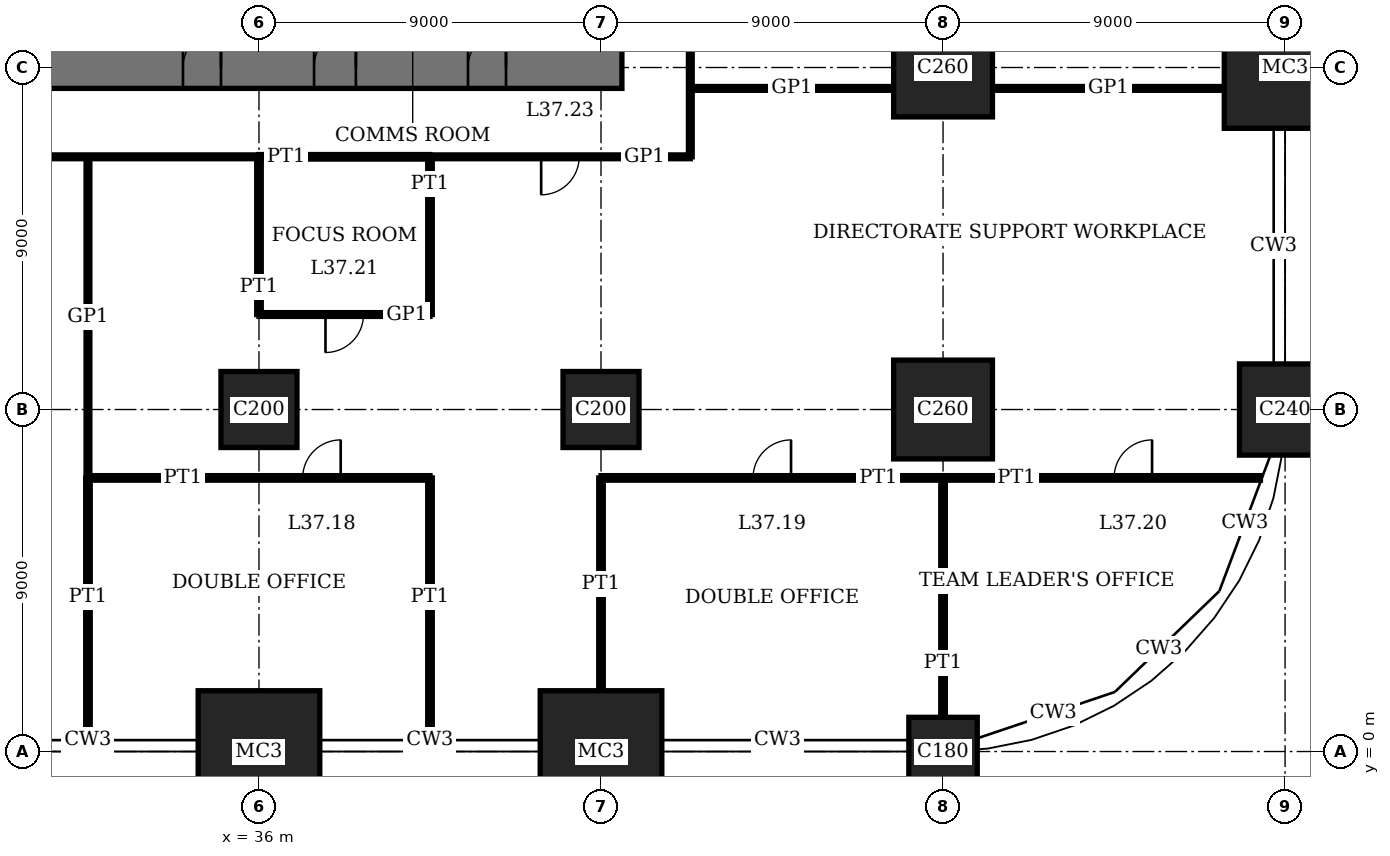
"""IFC4 building model, lengths in metres.
Left out: names, types, materials, properties, quantities, classifications, styles, units other than length and angle.
Written with IfcOpenShell. Run it as: python <this file> out.ifc"""

import sys

from ifc_helpers import new_model, si_unit, direction, frame, frame_2d, origin, origin_2d, place, context, subcontext, project, spatial, rectangle, extrude, element, fill, save


model = new_model("IFC4")
c1 = context("Model", 3, precision=1e-05, world=origin(), true_north=direction((0.0, 1.0)))
c2 = subcontext(c1, "Body", "Model", "MODEL_VIEW")
j1 = project(units=[si_unit("LENGTHUNIT", "METRE"), si_unit("PLANEANGLEUNIT", "RADIAN")], contexts=[c1])
p1 = place(None, origin())
s1 = spatial("IfcSite", under=j1, at=p1, CompositionType="ELEMENT")
p2 = place(p1, origin())
s2 = spatial("IfcBuilding", under=s1, at=p2, CompositionType="ELEMENT")
p3 = place(p2, frame((0.0, 0.0, 153.0)))
s3 = spatial("IfcBuildingStorey", under=s2, at=p3, CompositionType="ELEMENT", Elevation=153.0)
p4 = place(p3, frame((36.0, 0.0, 0.0), z_axis=(0.0, 0.0, 1.0), x_axis=(1.0, 0.0, 0.0)))
e1 = element("IfcColumn", 1, at=p4, inside=s3, PredefinedType="COLUMN", context=c2, shape_type="SweptSolid", body=[
    extrude(rectangle(XDim=3.2, YDim=3.2, at=origin_2d()), origin(), (0.0, 0.0, 1.0), 4.2),
])
p5 = place(p3, frame((36.0, 9.0, 0.0), z_axis=(0.0, 0.0, 1.0), x_axis=(1.0, 0.0, 0.0)))
e2 = element("IfcColumn", 2, at=p5, inside=s3, PredefinedType="COLUMN", context=c2, shape_type="SweptSolid", body=[
    extrude(rectangle(XDim=2.0, YDim=2.0, at=origin_2d()), origin(), (0.0, 0.0, 1.0), 4.2),
])
p6 = place(p3, frame((45.0, 0.0, 0.0), z_axis=(0.0, 0.0, 1.0), x_axis=(1.0, 0.0, 0.0)))
e3 = element("IfcColumn", 3, at=p6, inside=s3, PredefinedType="COLUMN", context=c2, shape_type="SweptSolid", body=[
    extrude(rectangle(XDim=3.2, YDim=3.2, at=origin_2d()), origin(), (0.0, 0.0, 1.0), 4.2),
])
p7 = place(p3, frame((45.0, 9.0, 0.0), z_axis=(0.0, 0.0, 1.0), x_axis=(1.0, 0.0, 0.0)))
e4 = element("IfcColumn", 4, at=p7, inside=s3, PredefinedType="COLUMN", context=c2, shape_type="SweptSolid", body=[
    extrude(rectangle(XDim=2.0, YDim=2.0, at=origin_2d()), origin(), (0.0, 0.0, 1.0), 4.2),
])
p8 = place(p3, frame((54.0, 0.0, 0.0), z_axis=(0.0, 0.0, 1.0), x_axis=(1.0, 0.0, 0.0)))
e5 = element("IfcColumn", 5, at=p8, inside=s3, PredefinedType="COLUMN", context=c2, shape_type="SweptSolid", body=[
    extrude(rectangle(XDim=1.8, YDim=1.8, at=origin_2d()), origin(), (0.0, 0.0, 1.0), 4.2),
])
for number, where, z_axis, x_axis in (
    (6, (54.0, 9.0, 0.0), (0.0, 0.0, 1.0), (1.0, 0.0, 0.0)),
    (7, (54.0, 18.0, 0.0), (0.0, 0.0, 1.0), (1.0, 0.0, 0.0)),
):
    element("IfcColumn", number, at=place(p3, frame(where, z_axis=z_axis, x_axis=x_axis)), inside=s3, PredefinedType="COLUMN", context=c2, shape_type="SweptSolid", body=[
        extrude(rectangle(XDim=2.6, YDim=2.6, at=origin_2d()), origin(), (0.0, 0.0, 1.0), 4.2),
    ])
p9 = place(p3, frame((63.0, 9.0, 0.0), z_axis=(0.0, 0.0, 1.0), x_axis=(1.0, 0.0, 0.0)))
e8 = element("IfcColumn", 8, at=p9, inside=s3, PredefinedType="COLUMN", context=c2, shape_type="SweptSolid", body=[
    extrude(rectangle(XDim=2.4, YDim=2.4, at=origin_2d()), origin(), (0.0, 0.0, 1.0), 4.2),
])
p10 = place(p3, frame((63.0, 18.0, 0.0), z_axis=(0.0, 0.0, 1.0), x_axis=(1.0, 0.0, 0.0)))
e9 = element("IfcColumn", 9, at=p10, inside=s3, PredefinedType="COLUMN", context=c2, shape_type="SweptSolid", body=[
    extrude(rectangle(XDim=3.2, YDim=3.2, at=origin_2d()), origin(), (0.0, 0.0, 1.0), 4.2),
])
p11 = place(p3, frame((17.45, 18.0, 0.0), z_axis=(0.0, 0.0, 1.0), x_axis=(1.0, 0.0, 0.0)))
e10 = element("IfcWall", 10, at=p11, inside=s3, PredefinedType="SHEAR", context=c2, shape_type="SweptSolid", body=[
    extrude(rectangle(XDim=28.1, YDim=1.1, at=frame_2d((14.05, 0.0))), origin(), (0.0, 0.0, 1.0), 4.2),
])
p12 = place(p11, frame((11.55, 0.0, 0.0)))
e11 = element("IfcOpeningElement", 11, at=p12, cuts=e10, PredefinedType="OPENING", context=c2, shape_type="SweptSolid", body=[
    extrude(rectangle(XDim=1.0, YDim=2.4, at=frame_2d((0.5, 1.2))), frame((0.0, 0.56, 0.0), z_axis=(0.0, -1.0, 0.0), x_axis=(1.0, 0.0, 0.0)), (0.0, 0.0, 1.0), 1.12),
])
p13 = place(p11, frame((16.55, 0.0, 0.0)))
e12 = element("IfcOpeningElement", 12, at=p13, cuts=e10, PredefinedType="OPENING", context=c2, shape_type="SweptSolid", body=[
    extrude(rectangle(XDim=1.0, YDim=2.4, at=frame_2d((0.5, 1.2))), frame((0.0, 0.56, 0.0), z_axis=(0.0, -1.0, 0.0), x_axis=(1.0, 0.0, 0.0)), (0.0, 0.0, 1.0), 1.12),
])
p14 = place(p11, frame((20.0, 0.0, 0.0)))
e13 = element("IfcOpeningElement", 13, at=p14, cuts=e10, PredefinedType="OPENING", context=c2, shape_type="SweptSolid", body=[
    extrude(rectangle(XDim=1.1, YDim=2.4, at=frame_2d((0.55, 1.2))), frame((0.0, 0.56, 0.0), z_axis=(0.0, -1.0, 0.0), x_axis=(1.0, 0.0, 0.0)), (0.0, 0.0, 1.0), 1.12),
])
p15 = place(p11, frame((24.05, 0.0, 0.0)))
e14 = element("IfcOpeningElement", 14, at=p15, cuts=e10, PredefinedType="OPENING", context=c2, shape_type="SweptSolid", body=[
    extrude(rectangle(XDim=1.0, YDim=2.4, at=frame_2d((0.5, 1.2))), frame((0.0, 0.56, 0.0), z_axis=(0.0, -1.0, 0.0), x_axis=(1.0, 0.0, 0.0)), (0.0, 0.0, 1.0), 1.12),
])
p16 = place(p3, frame((31.5, 7.2, 0.0), z_axis=(0.0, 0.0, 1.0), x_axis=(1.0, 0.0, 0.0)))
e15 = element("IfcWall", 15, at=p16, inside=s3, PredefinedType="PARTITIONING", context=c2, shape_type="SweptSolid", body=[
    extrude(rectangle(XDim=9.0, YDim=0.12, at=frame_2d((4.5, 0.0))), origin(), (0.0, 0.0, 1.0), 3.85),
])
p17 = place(p16, frame((5.65, 0.0, 0.0)))
e16 = element("IfcOpeningElement", 16, at=p17, cuts=e15, PredefinedType="OPENING", context=c2, shape_type="SweptSolid", body=[
    extrude(rectangle(XDim=1.0, YDim=2.4, at=frame_2d((0.5, 1.2))), frame((0.0, 0.07, 0.0), z_axis=(0.0, -1.0, 0.0), x_axis=(1.0, 0.0, 0.0)), (0.0, 0.0, 1.0), 0.14),
])
p18 = place(p3, frame((45.0, 7.2, 0.0), z_axis=(0.0, 0.0, 1.0), x_axis=(1.0, 0.0, 0.0)))
e17 = element("IfcWall", 17, at=p18, inside=s3, PredefinedType="PARTITIONING", context=c2, shape_type="SweptSolid", body=[
    extrude(rectangle(XDim=9.0, YDim=0.12, at=frame_2d((4.5, 0.0))), origin(), (0.0, 0.0, 1.0), 3.85),
])
p19 = place(p18, frame((4.0, 0.0, 0.0)))
e18 = element("IfcOpeningElement", 18, at=p19, cuts=e17, PredefinedType="OPENING", context=c2, shape_type="SweptSolid", body=[
    extrude(rectangle(XDim=1.0, YDim=2.4, at=frame_2d((0.5, 1.2))), frame((0.0, 0.07, 0.0), z_axis=(0.0, -1.0, 0.0), x_axis=(1.0, 0.0, 0.0)), (0.0, 0.0, 1.0), 0.14),
])
p20 = place(p3, frame((54.0, 7.2, 0.0), z_axis=(0.0, 0.0, 1.0), x_axis=(1.0, 0.0, 0.0)))
e19 = element("IfcWall", 19, at=p20, inside=s3, PredefinedType="PARTITIONING", context=c2, shape_type="SweptSolid", body=[
    extrude(rectangle(XDim=8.351, YDim=0.12, at=frame_2d((4.176, 0.0))), origin(), (0.0, 0.0, 1.0), 3.85),
])
p21 = place(p20, frame((4.5, 0.0, 0.0)))
e20 = element("IfcOpeningElement", 20, at=p21, cuts=e19, PredefinedType="OPENING", context=c2, shape_type="SweptSolid", body=[
    extrude(rectangle(XDim=1.0, YDim=2.4, at=frame_2d((0.5, 1.2))), frame((0.0, 0.07, 0.0), z_axis=(0.0, -1.0, 0.0), x_axis=(1.0, 0.0, 0.0)), (0.0, 0.0, 1.0), 0.14),
])
p22 = place(p3, frame((36.0, 11.5, 0.0), z_axis=(0.0, 0.0, 1.0), x_axis=(1.0, 0.0, 0.0)))
e21 = element("IfcWall", 21, at=p22, inside=s3, PredefinedType="PARTITIONING", context=c2, shape_type="SweptSolid", body=[
    extrude(rectangle(XDim=4.5, YDim=0.1, at=frame_2d((2.25, 0.0))), origin(), (0.0, 0.0, 1.0), 3.85),
])
p23 = place(p22, frame((1.75, 0.0, 0.0)))
e22 = element("IfcOpeningElement", 22, at=p23, cuts=e21, PredefinedType="OPENING", context=c2, shape_type="SweptSolid", body=[
    extrude(rectangle(XDim=1.0, YDim=2.4, at=frame_2d((0.5, 1.2))), frame((0.0, 0.06, 0.0), z_axis=(0.0, -1.0, 0.0), x_axis=(1.0, 0.0, 0.0)), (0.0, 0.0, 1.0), 0.12),
])
p24 = place(p3, frame((36.0, 15.65, 0.0), z_axis=(0.0, 0.0, 1.0), x_axis=(1.0, 0.0, 0.0)))
e23 = element("IfcWall", 23, at=p24, inside=s3, PredefinedType="PARTITIONING", context=c2, shape_type="SweptSolid", body=[
    extrude(rectangle(XDim=4.5, YDim=0.12, at=frame_2d((2.25, 0.0))), origin(), (0.0, 0.0, 1.0), 3.85),
])
p25 = place(p3, frame((15.65, 15.65, 0.0), z_axis=(0.0, 0.0, 1.0), x_axis=(1.0, 0.0, 0.0)))
e24 = element("IfcWall", 24, at=p25, inside=s3, PredefinedType="PARTITIONING", context=c2, shape_type="SweptSolid", body=[
    extrude(rectangle(XDim=20.35, YDim=0.1, at=frame_2d((10.175, 0.0))), origin(), (0.0, 0.0, 1.0), 3.85),
])
p26 = place(p25, frame((9.675, 0.0, 0.0)))
e25 = element("IfcOpeningElement", 25, at=p26, cuts=e24, PredefinedType="OPENING", context=c2, shape_type="SweptSolid", body=[
    extrude(rectangle(XDim=1.0, YDim=2.4, at=frame_2d((0.5, 1.2))), frame((0.0, 0.06, 0.0), z_axis=(0.0, -1.0, 0.0), x_axis=(1.0, 0.0, 0.0)), (0.0, 0.0, 1.0), 0.12),
])
p27 = place(p3, frame((40.5, 15.65, 0.0), z_axis=(0.0, 0.0, 1.0), x_axis=(1.0, 0.0, 0.0)))
e26 = element("IfcWall", 26, at=p27, inside=s3, PredefinedType="PARTITIONING", context=c2, shape_type="SweptSolid", body=[
    extrude(rectangle(XDim=6.85, YDim=0.1, at=frame_2d((3.425, 0.0))), origin(), (0.0, 0.0, 1.0), 3.85),
])
p28 = place(p27, frame((2.925, 0.0, 0.0)))
e27 = element("IfcOpeningElement", 27, at=p28, cuts=e26, PredefinedType="OPENING", context=c2, shape_type="SweptSolid", body=[
    extrude(rectangle(XDim=1.0, YDim=2.4, at=frame_2d((0.5, 1.2))), frame((0.0, 0.06, 0.0), z_axis=(0.0, -1.0, 0.0), x_axis=(1.0, 0.0, 0.0)), (0.0, 0.0, 1.0), 0.12),
])
p29 = place(p3, frame((47.35, 17.45, 0.0), z_axis=(0.0, 0.0, 1.0), x_axis=(1.0, 0.0, 0.0)))
e28 = element("IfcWall", 28, at=p29, inside=s3, PredefinedType="PARTITIONING", context=c2, shape_type="SweptSolid", body=[
    extrude(rectangle(XDim=5.35, YDim=0.1, at=frame_2d((2.675, 0.0))), origin(), (0.0, 0.0, 1.0), 3.85),
])
p30 = place(p3, frame((55.3, 17.45, 0.0), z_axis=(0.0, 0.0, 1.0), x_axis=(1.0, 0.0, 0.0)))
e29 = element("IfcWall", 29, at=p30, inside=s3, PredefinedType="PARTITIONING", context=c2, shape_type="SweptSolid", body=[
    extrude(rectangle(XDim=6.1, YDim=0.1, at=frame_2d((3.05, 0.0))), origin(), (0.0, 0.0, 1.0), 3.85),
])
p31 = place(p3, frame((31.5, 0.31, 0.0), z_axis=(0.0, 0.0, 1.0), x_axis=(0.0, 1.0, 0.0)))
e30 = element("IfcWall", 30, at=p31, inside=s3, PredefinedType="PARTITIONING", context=c2, shape_type="SweptSolid", body=[
    extrude(rectangle(XDim=6.89, YDim=0.12, at=frame_2d((3.445, 0.0))), origin(), (0.0, 0.0, 1.0), 3.85),
])
p32 = place(p3, frame((31.5, 7.2, 0.0), z_axis=(0.0, 0.0, 1.0), x_axis=(0.0, 1.0, 0.0)))
e31 = element("IfcWall", 31, at=p32, inside=s3, PredefinedType="PARTITIONING", context=c2, shape_type="SweptSolid", body=[
    extrude(rectangle(XDim=8.45, YDim=0.1, at=frame_2d((4.225, 0.0))), origin(), (0.0, 0.0, 1.0), 3.85),
])
p33 = place(p3, frame((36.0, 11.5, 0.0), z_axis=(0.0, 0.0, 1.0), x_axis=(0.0, 1.0, 0.0)))
e32 = element("IfcWall", 32, at=p33, inside=s3, PredefinedType="PARTITIONING", context=c2, shape_type="SweptSolid", body=[
    extrude(rectangle(XDim=4.15, YDim=0.12, at=frame_2d((2.075, 0.0))), origin(), (0.0, 0.0, 1.0), 3.25),
])
p34 = place(p3, frame((40.5, 0.31, 0.0), z_axis=(0.0, 0.0, 1.0), x_axis=(0.0, 1.0, 0.0)))
e33 = element("IfcWall", 33, at=p34, inside=s3, PredefinedType="PARTITIONING", context=c2, shape_type="SweptSolid", body=[
    extrude(rectangle(XDim=6.89, YDim=0.12, at=frame_2d((3.445, 0.0))), origin(), (0.0, 0.0, 1.0), 3.85),
])
p35 = place(p3, frame((40.5, 11.5, 0.0), z_axis=(0.0, 0.0, 1.0), x_axis=(0.0, 1.0, 0.0)))
e34 = element("IfcWall", 34, at=p35, inside=s3, PredefinedType="PARTITIONING", context=c2, shape_type="SweptSolid", body=[
    extrude(rectangle(XDim=4.15, YDim=0.12, at=frame_2d((2.075, 0.0))), origin(), (0.0, 0.0, 1.0), 3.85),
])
p36 = place(p3, frame((45.0, 1.6, 0.0), z_axis=(0.0, 0.0, 1.0), x_axis=(0.0, 1.0, 0.0)))
e35 = element("IfcWall", 35, at=p36, inside=s3, PredefinedType="PARTITIONING", context=c2, shape_type="SweptSolid", body=[
    extrude(rectangle(XDim=5.6, YDim=0.12, at=frame_2d((2.8, 0.0))), origin(), (0.0, 0.0, 1.0), 3.25),
])
p37 = place(p3, frame((47.35, 15.65, 0.0), z_axis=(0.0, 0.0, 1.0), x_axis=(0.0, 1.0, 0.0)))
e36 = element("IfcWall", 36, at=p37, inside=s3, PredefinedType="PARTITIONING", context=c2, shape_type="SweptSolid", body=[
    extrude(rectangle(XDim=11.35, YDim=0.1, at=frame_2d((5.675, 0.0))), origin(), (0.0, 0.0, 1.0), 3.85),
])
p38 = place(p37, frame((5.175, 0.0, 0.0)))
e37 = element("IfcOpeningElement", 37, at=p38, cuts=e36, PredefinedType="OPENING", context=c2, shape_type="SweptSolid", body=[
    extrude(rectangle(XDim=1.0, YDim=2.4, at=frame_2d((0.5, 1.2))), frame((0.0, 0.06, 0.0), z_axis=(0.0, -1.0, 0.0), x_axis=(1.0, 0.0, 0.0)), (0.0, 0.0, 1.0), 0.12),
])
p39 = place(p3, frame((54.0, 0.9, 0.0), z_axis=(0.0, 0.0, 1.0), x_axis=(0.0, 1.0, 0.0)))
e38 = element("IfcWall", 38, at=p39, inside=s3, PredefinedType="PARTITIONING", context=c2, shape_type="SweptSolid", body=[
    extrude(rectangle(XDim=6.3, YDim=0.12, at=frame_2d((3.15, 0.0))), origin(), (0.0, 0.0, 1.0), 3.05),
])
p40 = place(p13, origin())
e39 = element("IfcDoor", 39, at=p40, inside=s3, OperationType="SINGLE_SWING_LEFT", PredefinedType="DOOR", context=c2, shape_type="SweptSolid", body=[
    extrude(rectangle(XDim=1.0, YDim=2.4, at=frame_2d((0.5, 1.2))), frame((0.0, 0.025, 0.0), z_axis=(0.0, -1.0, 0.0), x_axis=(1.0, 0.0, 0.0)), (0.0, 0.0, 1.0), 0.05),
    extrude(rectangle(XDim=0.04, YDim=2.4, at=frame_2d((0.02, 1.2))), frame((0.0, 0.4, 0.0), z_axis=(0.0, -1.0, 0.0), x_axis=(1.0, 0.0, 0.0)), (0.0, 0.0, 1.0), 0.8),
    extrude(rectangle(XDim=0.04, YDim=2.4, at=frame_2d((0.98, 1.2))), frame((0.0, 0.4, 0.0), z_axis=(0.0, -1.0, 0.0), x_axis=(1.0, 0.0, 0.0)), (0.0, 0.0, 1.0), 0.8),
    extrude(rectangle(XDim=1.0, YDim=0.04, at=frame_2d((0.5, 2.38))), frame((0.0, 0.4, 0.0), z_axis=(0.0, -1.0, 0.0), x_axis=(1.0, 0.0, 0.0)), (0.0, 0.0, 1.0), 0.8),
])
fill(e12, e39)
p41 = place(p14, origin())
e40 = element("IfcDoor", 40, at=p41, inside=s3, OperationType="SINGLE_SWING_LEFT", PredefinedType="DOOR", context=c2, shape_type="SweptSolid", body=[
    extrude(rectangle(XDim=1.1, YDim=2.4, at=frame_2d((0.55, 1.2))), frame((0.0, 0.025, 0.0), z_axis=(0.0, -1.0, 0.0), x_axis=(1.0, 0.0, 0.0)), (0.0, 0.0, 1.0), 0.05),
    extrude(rectangle(XDim=0.04, YDim=2.4, at=frame_2d((0.02, 1.2))), frame((0.0, 0.44, 0.0), z_axis=(0.0, -1.0, 0.0), x_axis=(1.0, 0.0, 0.0)), (0.0, 0.0, 1.0), 0.88),
    extrude(rectangle(XDim=0.04, YDim=2.4, at=frame_2d((1.08, 1.2))), frame((0.0, 0.44, 0.0), z_axis=(0.0, -1.0, 0.0), x_axis=(1.0, 0.0, 0.0)), (0.0, 0.0, 1.0), 0.88),
    extrude(rectangle(XDim=1.1, YDim=0.04, at=frame_2d((0.55, 2.38))), frame((0.0, 0.44, 0.0), z_axis=(0.0, -1.0, 0.0), x_axis=(1.0, 0.0, 0.0)), (0.0, 0.0, 1.0), 0.88),
])
fill(e13, e40)
p42 = place(p15, origin())
e41 = element("IfcDoor", 41, at=p42, inside=s3, OperationType="SINGLE_SWING_LEFT", PredefinedType="DOOR", context=c2, shape_type="SweptSolid", body=[
    extrude(rectangle(XDim=1.0, YDim=2.4, at=frame_2d((0.5, 1.2))), frame((0.0, 0.025, 0.0), z_axis=(0.0, -1.0, 0.0), x_axis=(1.0, 0.0, 0.0)), (0.0, 0.0, 1.0), 0.05),
    extrude(rectangle(XDim=0.04, YDim=2.4, at=frame_2d((0.02, 1.2))), frame((0.0, 0.4, 0.0), z_axis=(0.0, -1.0, 0.0), x_axis=(1.0, 0.0, 0.0)), (0.0, 0.0, 1.0), 0.8),
    extrude(rectangle(XDim=0.04, YDim=2.4, at=frame_2d((0.98, 1.2))), frame((0.0, 0.4, 0.0), z_axis=(0.0, -1.0, 0.0), x_axis=(1.0, 0.0, 0.0)), (0.0, 0.0, 1.0), 0.8),
    extrude(rectangle(XDim=1.0, YDim=0.04, at=frame_2d((0.5, 2.38))), frame((0.0, 0.4, 0.0), z_axis=(0.0, -1.0, 0.0), x_axis=(1.0, 0.0, 0.0)), (0.0, 0.0, 1.0), 0.8),
])
fill(e14, e41)
p43 = place(p17, origin())
e42 = element("IfcDoor", 42, at=p43, inside=s3, OperationType="SINGLE_SWING_LEFT", PredefinedType="DOOR", context=c2, shape_type="SweptSolid", body=[
    extrude(rectangle(XDim=1.0, YDim=2.4, at=frame_2d((0.5, 1.2))), frame((0.0, 0.025, 0.0), z_axis=(0.0, -1.0, 0.0), x_axis=(1.0, 0.0, 0.0)), (0.0, 0.0, 1.0), 0.05),
])
fill(e16, e42)
p44 = place(p19, origin())
e43 = element("IfcDoor", 43, at=p44, inside=s3, OperationType="SINGLE_SWING_LEFT", PredefinedType="DOOR", context=c2, shape_type="SweptSolid", body=[
    extrude(rectangle(XDim=1.0, YDim=2.4, at=frame_2d((0.5, 1.2))), frame((0.0, 0.025, 0.0), z_axis=(0.0, -1.0, 0.0), x_axis=(1.0, 0.0, 0.0)), (0.0, 0.0, 1.0), 0.05),
])
fill(e18, e43)
p45 = place(p21, origin())
e44 = element("IfcDoor", 44, at=p45, inside=s3, OperationType="SINGLE_SWING_LEFT", PredefinedType="DOOR", context=c2, shape_type="SweptSolid", body=[
    extrude(rectangle(XDim=1.0, YDim=2.4, at=frame_2d((0.5, 1.2))), frame((0.0, 0.025, 0.0), z_axis=(0.0, -1.0, 0.0), x_axis=(1.0, 0.0, 0.0)), (0.0, 0.0, 1.0), 0.05),
])
fill(e20, e44)
p46 = place(p23, origin())
e45 = element("IfcDoor", 45, at=p46, inside=s3, OperationType="SINGLE_SWING_LEFT", PredefinedType="DOOR", context=c2, shape_type="SweptSolid", body=[
    extrude(rectangle(XDim=1.0, YDim=2.4, at=frame_2d((0.5, 1.2))), frame((0.0, 0.02, 0.0), z_axis=(0.0, -1.0, 0.0), x_axis=(1.0, 0.0, 0.0)), (0.0, 0.0, 1.0), 0.04),
])
fill(e22, e45)
p47 = place(p28, origin())
e46 = element("IfcDoor", 46, at=p47, inside=s3, OperationType="SINGLE_SWING_LEFT", PredefinedType="DOOR", context=c2, shape_type="SweptSolid", body=[
    extrude(rectangle(XDim=1.0, YDim=2.4, at=frame_2d((0.5, 1.2))), frame((0.0, 0.02, 0.0), z_axis=(0.0, -1.0, 0.0), x_axis=(1.0, 0.0, 0.0)), (0.0, 0.0, 1.0), 0.04),
])
fill(e27, e46)
save(model, sys.argv[1])
